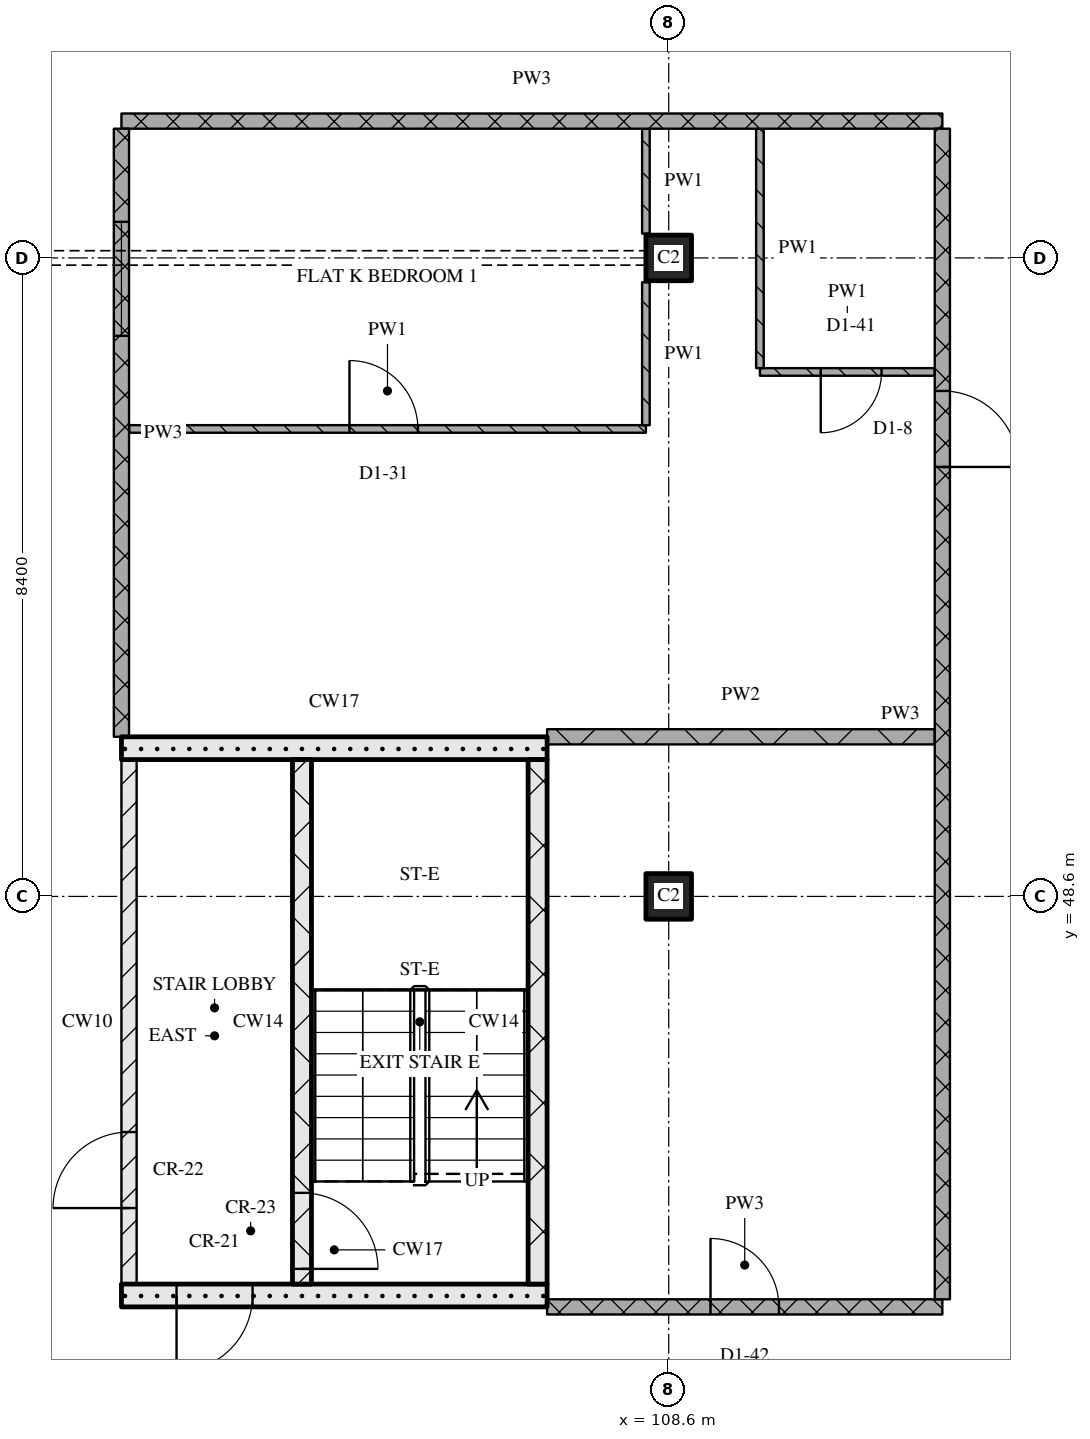
"""IFC4 building model, lengths in metres.
Left out: names, types, materials, properties, quantities, classifications, styles, units other than length and angle.
Written with IfcOpenShell. Run it as: python <this file> out.ifc"""

import sys

from ifc_helpers import new_model, si_unit, direction, frame, frame_2d, origin, origin_2d, place, context, subcontext, project, spatial, rectangle, extrude, element, fill, save


model = new_model("IFC4")
c1 = context("Model", 3, precision=1e-05, world=origin(), true_north=direction((0.0, 1.0)))
c2 = subcontext(c1, "Body", "Model", "MODEL_VIEW")
j1 = project(units=[si_unit("LENGTHUNIT", "METRE"), si_unit("PLANEANGLEUNIT", "RADIAN")], contexts=[c1])
p1 = place(None, origin())
s1 = spatial("IfcSite", under=j1, at=p1, CompositionType="ELEMENT")
p2 = place(p1, origin())
s2 = spatial("IfcBuilding", under=s1, at=p2, CompositionType="ELEMENT")
p3 = place(p2, frame((0.0, 0.0, 209.1)))
s3 = spatial("IfcBuildingStorey", under=s2, at=p3, CompositionType="ELEMENT", Elevation=209.1)
for number, where, z_axis, x_axis in (
    (1, (108.6, 48.6, 0.0), (0.0, 0.0, 1.0), (1.0, 0.0, 0.0)),
    (2, (108.6, 57.0, 0.0), (0.0, 0.0, 1.0), (1.0, 0.0, 0.0)),
):
    element("IfcColumn", number, at=place(p3, frame(where, z_axis=z_axis, x_axis=x_axis)), inside=s3, PredefinedType="COLUMN", context=c2, shape_type="SweptSolid", body=[
        extrude(rectangle(XDim=0.6, YDim=0.6, at=origin_2d()), origin(), (0.0, 0.0, 1.0), 3.6),
    ])
p4 = place(p3, frame((101.4, 43.35, 0.0), z_axis=(0.0, 0.0, 1.0), x_axis=(1.0, 0.0, 0.0)))
e3 = element("IfcWall", 3, at=p4, inside=s3, PredefinedType="SOLIDWALL", context=c2, shape_type="SweptSolid", body=[
    extrude(rectangle(XDim=5.6, YDim=0.3, at=frame_2d((2.8, 0.0))), origin(), (0.0, 0.0, 1.0), 3.32),
])
p5 = place(p4, frame((0.725, 0.0, 0.0)))
e4 = element("IfcOpeningElement", 4, at=p5, cuts=e3, PredefinedType="OPENING", context=c2, shape_type="SweptSolid", body=[
    extrude(rectangle(XDim=1.0, YDim=2.1, at=frame_2d((0.5, 1.05))), frame((0.0, 0.16, 0.0), z_axis=(0.0, -1.0, 0.0), x_axis=(1.0, 0.0, 0.0)), (0.0, 0.0, 1.0), 0.32),
])
p6 = place(p3, frame((101.5, 43.5, 0.0), z_axis=(0.0, 0.0, 1.0), x_axis=(0.0, 1.0, 0.0)))
e5 = element("IfcWall", 5, at=p6, inside=s3, PredefinedType="PARTITIONING", context=c2, shape_type="SweptSolid", body=[
    extrude(rectangle(XDim=6.9, YDim=0.2, at=frame_2d((3.45, 0.0))), origin(), (0.0, 0.0, 1.0), 3.32),
])
p7 = place(p6, frame((1.0, 0.0, 0.0)))
e6 = element("IfcOpeningElement", 6, at=p7, cuts=e5, PredefinedType="OPENING", context=c2, shape_type="SweptSolid", body=[
    extrude(rectangle(XDim=1.0, YDim=2.1, at=frame_2d((0.5, 1.05))), frame((0.0, 0.11, 0.0), z_axis=(0.0, -1.0, 0.0), x_axis=(1.0, 0.0, 0.0)), (0.0, 0.0, 1.0), 0.22),
])
p8 = place(p3, frame((103.775, 43.5, 0.0), z_axis=(0.0, 0.0, 1.0), x_axis=(0.0, 1.0, 0.0)))
e7 = element("IfcWall", 7, at=p8, inside=s3, PredefinedType="SOLIDWALL", context=c2, shape_type="SweptSolid", body=[
    extrude(rectangle(XDim=6.9, YDim=0.25, at=frame_2d((3.45, 0.0))), origin(), (0.0, 0.0, 1.0), 3.32),
])
p9 = place(p8, frame((0.2, 0.0, 0.0)))
e8 = element("IfcOpeningElement", 8, at=p9, cuts=e7, PredefinedType="OPENING", context=c2, shape_type="SweptSolid", body=[
    extrude(rectangle(XDim=1.0, YDim=2.1, at=frame_2d((0.5, 1.05))), frame((0.0, 0.135, 0.0), z_axis=(0.0, -1.0, 0.0), x_axis=(1.0, 0.0, 0.0)), (0.0, 0.0, 1.0), 0.27),
])
p10 = place(p3, frame((106.875, 43.5, 0.0), z_axis=(0.0, 0.0, 1.0), x_axis=(0.0, 1.0, 0.0)))
e9 = element("IfcWall", 9, at=p10, inside=s3, PredefinedType="SOLIDWALL", context=c2, shape_type="SweptSolid", body=[
    extrude(rectangle(XDim=6.9, YDim=0.25, at=frame_2d((3.45, 0.0))), origin(), (0.0, 0.0, 1.0), 3.32),
])
p11 = place(p3, frame((101.4, 50.55, 0.0), z_axis=(0.0, 0.0, 1.0), x_axis=(1.0, 0.0, 0.0)))
e10 = element("IfcWall", 10, at=p11, inside=s3, PredefinedType="SOLIDWALL", context=c2, shape_type="SweptSolid", body=[
    extrude(rectangle(XDim=5.6, YDim=0.3, at=frame_2d((2.8, 0.0))), origin(), (0.0, 0.0, 1.0), 3.32),
])
p12 = place(p3, frame((107.0, 43.2, 0.0), z_axis=(0.0, 0.0, 1.0), x_axis=(1.0, 0.0, 0.0)))
e11 = element("IfcWall", 11, at=p12, inside=s3, PredefinedType="PARTITIONING", context=c2, shape_type="SweptSolid", body=[
    extrude(rectangle(XDim=5.2, YDim=0.2, at=frame_2d((2.6, 0.0))), origin(), (0.0, 0.0, 1.0), 3.32),
])
p13 = place(p12, frame((2.15, 0.0, 0.0)))
e12 = element("IfcOpeningElement", 12, at=p13, cuts=e11, PredefinedType="OPENING", context=c2, shape_type="SweptSolid", body=[
    extrude(rectangle(XDim=0.9, YDim=2.1, at=frame_2d((0.45, 1.05))), frame((0.0, 0.11, 0.0), z_axis=(0.0, -1.0, 0.0), x_axis=(1.0, 0.0, 0.0)), (0.0, 0.0, 1.0), 0.22),
])
p14 = place(p3, frame((107.0, 50.7, 0.0), z_axis=(0.0, 0.0, 1.0), x_axis=(1.0, 0.0, 0.0)))
e13 = element("IfcWall", 13, at=p14, inside=s3, PredefinedType="PARTITIONING", context=c2, shape_type="SweptSolid", body=[
    extrude(rectangle(XDim=5.1, YDim=0.2, at=frame_2d((2.55, 0.0))), origin(), (0.0, 0.0, 1.0), 3.32),
])
p15 = place(p3, frame((101.5, 54.75, 0.0), z_axis=(0.0, 0.0, 1.0), x_axis=(1.0, 0.0, 0.0)))
e14 = element("IfcWall", 14, at=p15, inside=s3, PredefinedType="PARTITIONING", context=c2, shape_type="SweptSolid", body=[
    extrude(rectangle(XDim=6.8, YDim=0.1, at=frame_2d((3.4, 0.0))), origin(), (0.0, 0.0, 1.0), 3.32),
])
p16 = place(p15, frame((2.9, 0.0, 0.0)))
e15 = element("IfcOpeningElement", 15, at=p16, cuts=e14, PredefinedType="OPENING", context=c2, shape_type="SweptSolid", body=[
    extrude(rectangle(XDim=0.9, YDim=2.1, at=frame_2d((0.45, 1.05))), frame((0.0, 0.06, 0.0), z_axis=(0.0, -1.0, 0.0), x_axis=(1.0, 0.0, 0.0)), (0.0, 0.0, 1.0), 0.12),
])
p17 = place(p3, frame((109.8, 55.5, 0.0), z_axis=(0.0, 0.0, 1.0), x_axis=(1.0, 0.0, 0.0)))
e16 = element("IfcWall", 16, at=p17, inside=s3, PredefinedType="PARTITIONING", context=c2, shape_type="SweptSolid", body=[
    extrude(rectangle(XDim=2.3, YDim=0.1, at=frame_2d((1.15, 0.0))), origin(), (0.0, 0.0, 1.0), 3.32),
])
p18 = place(p17, frame((0.8, 0.0, 0.0)))
e17 = element("IfcOpeningElement", 17, at=p18, cuts=e16, PredefinedType="OPENING", context=c2, shape_type="SweptSolid", body=[
    extrude(rectangle(XDim=0.8, YDim=2.1, at=frame_2d((0.4, 1.05))), frame((0.0, 0.06, 0.0), z_axis=(0.0, -1.0, 0.0), x_axis=(1.0, 0.0, 0.0)), (0.0, 0.0, 1.0), 0.12),
])
p19 = place(p3, frame((101.4, 58.8, 0.0), z_axis=(0.0, 0.0, 1.0), x_axis=(1.0, 0.0, 0.0)))
e18 = element("IfcWall", 18, at=p19, inside=s3, PredefinedType="PARTITIONING", context=c2, shape_type="SweptSolid", body=[
    extrude(rectangle(XDim=10.8, YDim=0.2, at=frame_2d((5.4, 0.0))), origin(), (0.0, 0.0, 1.0), 3.32),
])
p20 = place(p3, frame((101.4, 58.7, 0.0), z_axis=(0.0, 0.0, 1.0), x_axis=(0.0, -1.0, 0.0)))
e19 = element("IfcWall", 19, at=p20, inside=s3, PredefinedType="PARTITIONING", context=c2, shape_type="SweptSolid", body=[
    extrude(rectangle(XDim=8.0, YDim=0.2, at=frame_2d((4.0, 0.0))), origin(), (0.0, 0.0, 1.0), 3.32),
])
p21 = place(p20, frame((1.225, 0.0, 0.9)))
e20 = element("IfcOpeningElement", 20, at=p21, cuts=e19, PredefinedType="OPENING", context=c2, shape_type="SweptSolid", body=[
    extrude(rectangle(XDim=1.5, YDim=1.5, at=frame_2d((0.75, 0.75))), frame((0.0, 0.11, 0.0), z_axis=(0.0, -1.0, 0.0), x_axis=(1.0, 0.0, 0.0)), (0.0, 0.0, 1.0), 0.22),
])
p22 = place(p3, frame((108.3, 56.68, 0.0), z_axis=(0.0, 0.0, 1.0), x_axis=(0.0, -1.0, 0.0)))
e21 = element("IfcWall", 21, at=p22, inside=s3, PredefinedType="PARTITIONING", context=c2, shape_type="SweptSolid", body=[
    extrude(rectangle(XDim=1.88, YDim=0.1, at=frame_2d((0.94, 0.0))), origin(), (0.0, 0.0, 1.0), 3.32),
])
p23 = place(p3, frame((108.3, 58.7, 0.0), z_axis=(0.0, 0.0, 1.0), x_axis=(0.0, -1.0, 0.0)))
e22 = element("IfcWall", 22, at=p23, inside=s3, PredefinedType="PARTITIONING", context=c2, shape_type="SweptSolid", body=[
    extrude(rectangle(XDim=1.38, YDim=0.1, at=frame_2d((0.69, 0.0))), origin(), (0.0, 0.0, 1.0), 3.32),
])
p24 = place(p3, frame((109.8, 58.7, 0.0), z_axis=(0.0, 0.0, 1.0), x_axis=(0.0, -1.0, 0.0)))
e23 = element("IfcWall", 23, at=p24, inside=s3, PredefinedType="PARTITIONING", context=c2, shape_type="SweptSolid", body=[
    extrude(rectangle(XDim=3.15, YDim=0.1, at=frame_2d((1.575, 0.0))), origin(), (0.0, 0.0, 1.0), 3.32),
])
p25 = place(p3, frame((112.2, 43.3, 0.0), z_axis=(0.0, 0.0, 1.0), x_axis=(0.0, 1.0, 0.0)))
e24 = element("IfcWall", 24, at=p25, inside=s3, PredefinedType="PARTITIONING", context=c2, shape_type="SweptSolid", body=[
    extrude(rectangle(XDim=15.4, YDim=0.2, at=frame_2d((7.7, 0.0))), origin(), (0.0, 0.0, 1.0), 3.32),
])
p26 = place(p25, frame((10.95, 0.0, 0.0)))
e25 = element("IfcOpeningElement", 25, at=p26, cuts=e24, PredefinedType="OPENING", context=c2, shape_type="SweptSolid", body=[
    extrude(rectangle(XDim=1.0, YDim=2.1, at=frame_2d((0.5, 1.05))), frame((0.0, 0.11, 0.0), z_axis=(0.0, -1.0, 0.0), x_axis=(1.0, 0.0, 0.0)), (0.0, 0.0, 1.0), 0.22),
])
p27 = place(p5, origin())
e26 = element("IfcDoor", 26, at=p27, inside=s3, OperationType="SINGLE_SWING_RIGHT", PredefinedType="DOOR", context=c2, shape_type="SweptSolid", body=[
    extrude(rectangle(XDim=1.0, YDim=2.1, at=frame_2d((0.5, 1.05))), frame((0.0, 0.025, 0.0), z_axis=(0.0, -1.0, 0.0), x_axis=(1.0, 0.0, 0.0)), (0.0, 0.0, 1.0), 0.05),
])
fill(e4, e26)
p28 = place(p9, origin())
e27 = element("IfcDoor", 27, at=p28, inside=s3, OperationType="SINGLE_SWING_RIGHT", PredefinedType="DOOR", context=c2, shape_type="SweptSolid", body=[
    extrude(rectangle(XDim=1.0, YDim=2.1, at=frame_2d((0.5, 1.05))), frame((0.0, 0.025, 0.0), z_axis=(0.0, -1.0, 0.0), x_axis=(1.0, 0.0, 0.0)), (0.0, 0.0, 1.0), 0.05),
])
fill(e8, e27)
p29 = place(p7, origin())
e28 = element("IfcDoor", 28, at=p29, inside=s3, OperationType="SINGLE_SWING_LEFT", PredefinedType="DOOR", context=c2, shape_type="SweptSolid", body=[
    extrude(rectangle(XDim=1.0, YDim=2.1, at=frame_2d((0.5, 1.05))), frame((0.0, 0.025, 0.0), z_axis=(0.0, -1.0, 0.0), x_axis=(1.0, 0.0, 0.0)), (0.0, 0.0, 1.0), 0.05),
])
fill(e6, e28)
p30 = place(p13, origin())
e29 = element("IfcDoor", 29, at=p30, inside=s3, OperationType="SINGLE_SWING_LEFT", PredefinedType="DOOR", context=c2, shape_type="SweptSolid", body=[
    extrude(rectangle(XDim=0.9, YDim=2.1, at=frame_2d((0.45, 1.05))), frame((0.0, 0.025, 0.0), z_axis=(0.0, -1.0, 0.0), x_axis=(1.0, 0.0, 0.0)), (0.0, 0.0, 1.0), 0.05),
])
fill(e12, e29)
p31 = place(p16, origin())
e30 = element("IfcDoor", 30, at=p31, inside=s3, OperationType="SINGLE_SWING_LEFT", PredefinedType="DOOR", context=c2, shape_type="SweptSolid", body=[
    extrude(rectangle(XDim=0.9, YDim=2.1, at=frame_2d((0.45, 1.05))), frame((0.0, 0.025, 0.0), z_axis=(0.0, -1.0, 0.0), x_axis=(1.0, 0.0, 0.0)), (0.0, 0.0, 1.0), 0.05),
])
fill(e15, e30)
p32 = place(p18, origin())
e31 = element("IfcDoor", 31, at=p32, inside=s3, OperationType="SINGLE_SWING_RIGHT", PredefinedType="DOOR", context=c2, shape_type="SweptSolid", body=[
    extrude(rectangle(XDim=0.8, YDim=2.1, at=frame_2d((0.4, 1.05))), frame((0.0, 0.025, 0.0), z_axis=(0.0, -1.0, 0.0), x_axis=(1.0, 0.0, 0.0)), (0.0, 0.0, 1.0), 0.05),
])
fill(e17, e31)
p33 = place(p26, origin())
e32 = element("IfcDoor", 32, at=p33, inside=s3, OperationType="SINGLE_SWING_RIGHT", PredefinedType="DOOR", context=c2, shape_type="SweptSolid", body=[
    extrude(rectangle(XDim=1.0, YDim=2.1, at=frame_2d((0.5, 1.05))), frame((0.0, 0.025, 0.0), z_axis=(0.0, -1.0, 0.0), x_axis=(1.0, 0.0, 0.0)), (0.0, 0.0, 1.0), 0.05),
])
fill(e25, e32)
p34 = place(p21, origin())
e33 = element("IfcWindow", 33, at=p34, inside=s3, PartitioningType="SINGLE_PANEL", PredefinedType="WINDOW", context=c2, shape_type="SweptSolid", body=[
    extrude(rectangle(XDim=1.5, YDim=1.5, at=frame_2d((0.75, 0.75))), frame((0.0, 0.03, 0.0), z_axis=(0.0, -1.0, 0.0), x_axis=(1.0, 0.0, 0.0)), (0.0, 0.0, 1.0), 0.06),
])
fill(e20, e33)
save(model, sys.argv[1])
